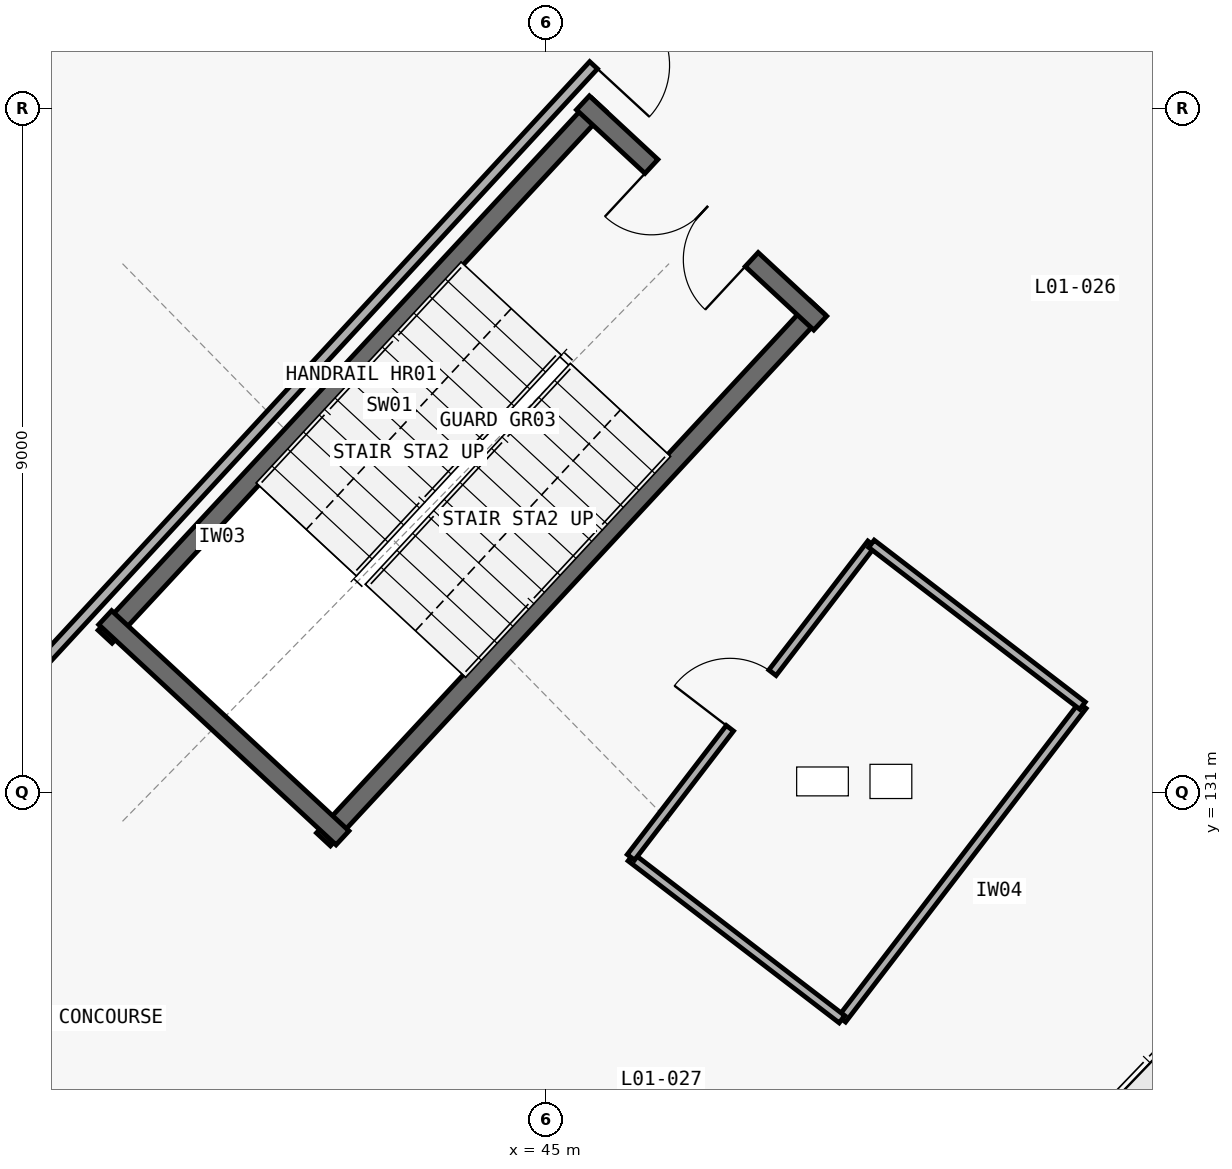
"""IFC4 building model, lengths in metres.
Left out: names, types, materials, properties, quantities, classifications, styles, units other than length and angle.
Written with IfcOpenShell. Run it as: python <this file> out.ifc"""

import sys

from ifc_helpers import new_model, si_unit, direction, frame, frame_2d, origin, place, context, subcontext, project, spatial, rectangle, extrude, element, fill, save


model = new_model("IFC4")
c1 = context("Model", 3, precision=1e-05, world=origin(), true_north=direction((0.0, 1.0)))
c2 = subcontext(c1, "Body", "Model", "MODEL_VIEW")
j1 = project(units=[si_unit("LENGTHUNIT", "METRE"), si_unit("PLANEANGLEUNIT", "RADIAN")], contexts=[c1])
p1 = place(None, origin())
s1 = spatial("IfcSite", under=j1, at=p1, CompositionType="ELEMENT")
p2 = place(p1, origin())
s2 = spatial("IfcBuilding", under=s1, at=p2, CompositionType="ELEMENT")
p3 = place(p2, frame((0.0, 0.0, 5.4)))
s3 = spatial("IfcBuildingStorey", under=s2, at=p3, CompositionType="ELEMENT", Elevation=5.4)
p4 = place(p3, frame((45.694, 140.048, 0.0), z_axis=(0.0, 0.0, 1.0), x_axis=(-0.680257902718, -0.7329728411, 0.0)))
e1 = element("IfcWall", 1, at=p4, inside=s3, PredefinedType="SHEAR", context=c2, shape_type="SweptSolid", body=[
    extrude(rectangle(XDim=9.55, YDim=0.25, at=frame_2d((4.775, 0.0))), origin(), (0.0, 0.0, 1.0), 4.52),
])
p5 = place(p3, frame((42.071, 130.381, 0.0), z_axis=(0.0, 0.0, 1.0), x_axis=(0.680245155897, 0.732984670971, 0.0)))
e2 = element("IfcWall", 2, at=p5, inside=s3, PredefinedType="SHEAR", context=c2, shape_type="SweptSolid", body=[
    extrude(rectangle(XDim=9.55, YDim=0.25, at=frame_2d((4.775, 0.0))), origin(), (0.0, 0.0, 1.0), 4.52),
])
p6 = place(p3, frame((48.607, 137.174, 0.0), z_axis=(0.0, 0.0, 1.0), x_axis=(-0.73295064559, 0.680281817433, 0.0)))
e3 = element("IfcWall", 3, at=p6, inside=s3, PredefinedType="SHEAR", context=c2, shape_type="SweptSolid", body=[
    extrude(rectangle(XDim=4.26, YDim=0.25, at=frame_2d((2.13, 0.0))), origin(), (0.0, 0.0, 1.0), 4.52),
])
p7 = place(p6, frame((1.23, 0.0, 0.0)))
e4 = element("IfcOpeningElement", 4, at=p7, cuts=e3, PredefinedType="OPENING", context=c2, shape_type="SweptSolid", body=[
    extrude(rectangle(XDim=1.8, YDim=2.25, at=frame_2d((0.9, 1.125))), frame((0.0, 0.135, 0.0), z_axis=(0.0, -1.0, 0.0), x_axis=(1.0, 0.0, 0.0)), (0.0, 0.0, 1.0), 0.27),
])
p8 = place(p3, frame((39.199, 133.299, 0.0), z_axis=(0.0, 0.0, 1.0), x_axis=(0.732977166505, -0.680253242096, 0.0)))
e5 = element("IfcWall", 5, at=p8, inside=s3, PredefinedType="SHEAR", context=c2, shape_type="SweptSolid", body=[
    extrude(rectangle(XDim=4.26, YDim=0.25, at=frame_2d((2.13, 0.0))), origin(), (0.0, 0.0, 1.0), 4.52),
])
p9 = place(p3, frame((52.058, 132.141, 0.0), z_axis=(0.0, 0.0, 1.0), x_axis=(-0.608625688463, -0.793457479228, 0.0)))
e6 = element("IfcWall", 6, at=p9, inside=s3, PredefinedType="PARTITIONING", context=c2, shape_type="SweptSolid", body=[
    extrude(rectangle(XDim=5.2, YDim=0.12, at=frame_2d((2.6, 0.0))), origin(), (0.0, 0.0, 1.0), 4.087),
])
p10 = place(p3, frame((48.893, 128.015, 0.0), z_axis=(0.0, 0.0, 1.0), x_axis=(-0.793331259853, 0.608790203715, 0.0)))
e7 = element("IfcWall", 7, at=p10, inside=s3, PredefinedType="PARTITIONING", context=c2, shape_type="SweptSolid", body=[
    extrude(rectangle(XDim=3.5, YDim=0.12, at=frame_2d((1.75, 0.0))), origin(), (0.0, 0.0, 1.0), 4.5),
])
p11 = place(p3, frame((46.116, 130.146, 0.0), z_axis=(0.0, 0.0, 1.0), x_axis=(0.608739062155, 0.793370502481, 0.0)))
e8 = element("IfcWall", 8, at=p11, inside=s3, PredefinedType="PARTITIONING", context=c2, shape_type="SweptSolid", body=[
    extrude(rectangle(XDim=5.199, YDim=0.12, at=frame_2d((2.6, 0.0))), origin(), (0.0, 0.0, 1.0), 3.815),
])
p12 = place(p11, frame((2.14, 0.0, 0.0)))
e9 = element("IfcOpeningElement", 9, at=p12, cuts=e8, PredefinedType="OPENING", context=c2, shape_type="SweptSolid", body=[
    extrude(rectangle(XDim=0.92, YDim=2.15, at=frame_2d((0.46, 1.075))), frame((0.0, 0.07, 0.0), z_axis=(0.0, -1.0, 0.0), x_axis=(1.0, 0.0, 0.0)), (0.0, 0.0, 1.0), 0.14),
])
p13 = place(p3, frame((49.281, 134.271, 0.0), z_axis=(0.0, 0.0, 1.0), x_axis=(0.793499685907, -0.608570660207, 0.0)))
e10 = element("IfcWall", 10, at=p13, inside=s3, PredefinedType="PARTITIONING", context=c2, shape_type="SweptSolid", body=[
    extrude(rectangle(XDim=3.5, YDim=0.12, at=frame_2d((1.75, 0.0))), origin(), (0.0, 0.0, 1.0), 3.815),
])
p14 = place(p3, frame((49.082, 144.312, 0.0), z_axis=(0.0, 0.0, 1.0), x_axis=(-0.678220768878, -0.734858209903, 0.0)))
e11 = element("IfcWall", 11, at=p14, inside=s3, PredefinedType="PARTITIONING", context=c2, shape_type="SweptSolid", body=[
    extrude(rectangle(XDim=20.85, YDim=0.14, at=frame_2d((10.425, 0.0))), origin(), (0.0, 0.0, 1.0), 3.665),
])
p15 = place(p14, frame((3.097, 0.0, 0.0)))
e12 = element("IfcOpeningElement", 12, at=p15, cuts=e11, PredefinedType="OPENING", context=c2, shape_type="SweptSolid", body=[
    extrude(rectangle(XDim=2.0, YDim=2.3, at=frame_2d((1.0, 1.15))), frame((0.0, 0.08, 0.0), z_axis=(0.0, -1.0, 0.0), x_axis=(1.0, 0.0, 0.0)), (0.0, 0.0, 1.0), 0.16),
])
p16 = place(p7, origin())
e13 = element("IfcDoor", 13, at=p16, inside=s3, OperationType="DOUBLE_DOOR_SINGLE_SWING", PredefinedType="DOOR", context=c2, shape_type="SweptSolid", body=[
    extrude(rectangle(XDim=1.8, YDim=2.25, at=frame_2d((0.9, 1.125))), frame((0.0, 0.025, 0.0), z_axis=(0.0, -1.0, 0.0), x_axis=(1.0, 0.0, 0.0)), (0.0, 0.0, 1.0), 0.05),
])
fill(e4, e13)
p17 = place(p12, origin())
e14 = element("IfcDoor", 14, at=p17, inside=s3, OperationType="SINGLE_SWING_LEFT", PredefinedType="DOOR", context=c2, shape_type="SweptSolid", body=[
    extrude(rectangle(XDim=0.92, YDim=2.15, at=frame_2d((0.46, 1.075))), frame((0.0, 0.025, 0.0), z_axis=(0.0, -1.0, 0.0), x_axis=(1.0, 0.0, 0.0)), (0.0, 0.0, 1.0), 0.05),
])
fill(e9, e14)
p18 = place(p15, origin())
e15 = element("IfcDoor", 15, at=p18, inside=s3, OperationType="DOUBLE_DOOR_SINGLE_SWING", PredefinedType="DOOR", context=c2, shape_type="SweptSolid", body=[
    extrude(rectangle(XDim=2.0, YDim=2.3, at=frame_2d((1.0, 1.15))), frame((0.0, 0.025, 0.0), z_axis=(0.0, -1.0, 0.0), x_axis=(1.0, 0.0, 0.0)), (0.0, 0.0, 1.0), 0.05),
])
fill(e12, e15)
save(model, sys.argv[1])
